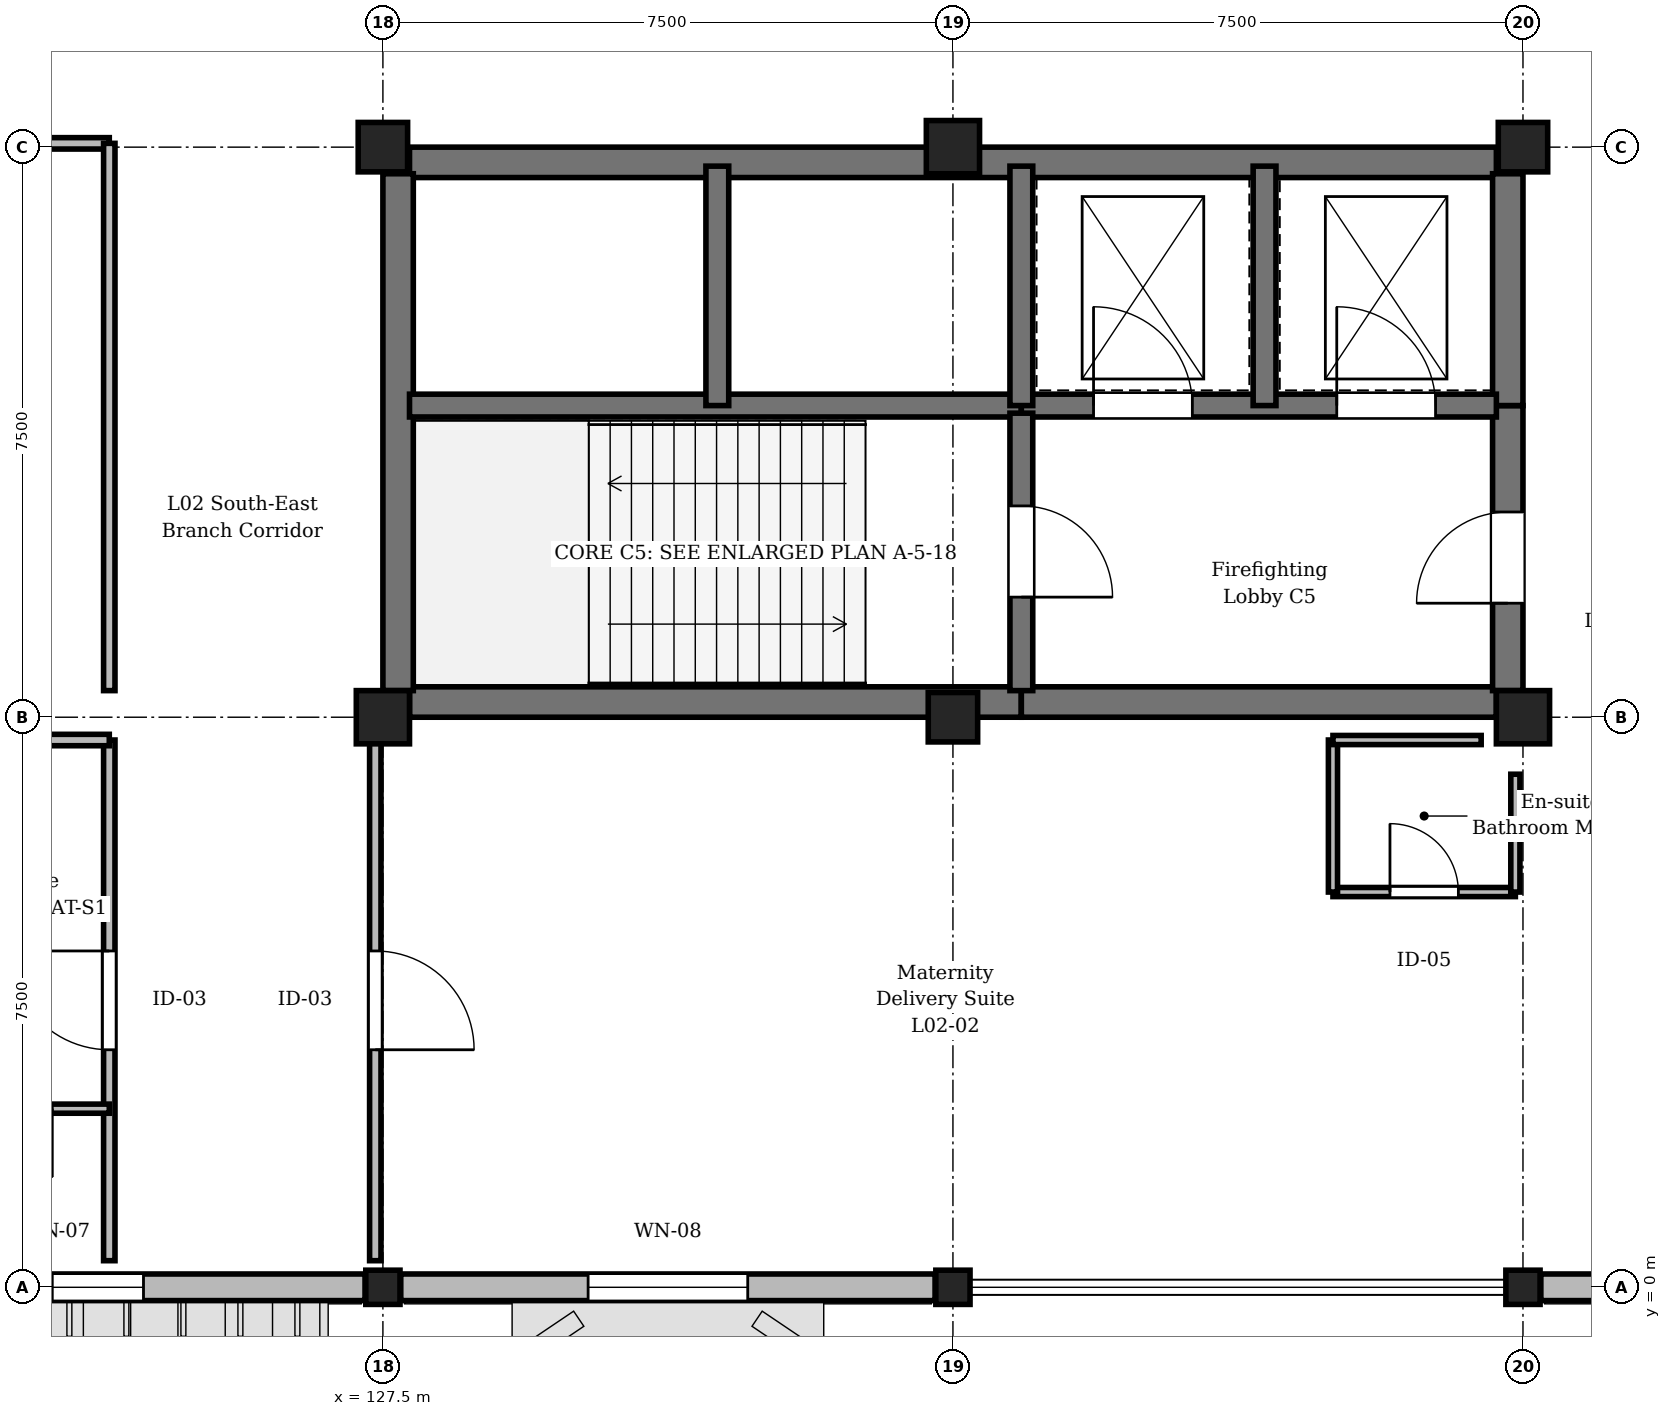
"""IFC4 building model, lengths in metres.
Left out: names, types, materials, properties, quantities, classifications, styles, units other than length and angle.
Written with IfcOpenShell. Run it as: python <this file> out.ifc"""

import sys

from ifc_helpers import new_model, si_unit, direction, frame, frame_2d, origin, origin_2d, place, context, subcontext, project, spatial, rectangle, extrude, element, fill, save


model = new_model("IFC4")
c1 = context("Model", 3, precision=1e-05, world=origin(), true_north=direction((0.0, 1.0)))
c2 = subcontext(c1, "Body", "Model", "MODEL_VIEW")
j1 = project(units=[si_unit("LENGTHUNIT", "METRE"), si_unit("PLANEANGLEUNIT", "RADIAN")], contexts=[c1])
p1 = place(None, origin())
s1 = spatial("IfcSite", under=j1, at=p1, CompositionType="ELEMENT")
p2 = place(p1, origin())
s2 = spatial("IfcBuilding", under=s1, at=p2, CompositionType="ELEMENT")
p3 = place(p2, frame((0.0, 0.0, 9.3)))
s3 = spatial("IfcBuildingStorey", under=s2, at=p3, CompositionType="ELEMENT", Elevation=9.3)
p4 = place(p3, frame((127.5, 0.0, 0.0), z_axis=(0.0, 0.0, 1.0), x_axis=(1.0, 0.0, 0.0)))
e1 = element("IfcColumn", 1, at=p4, inside=s3, PredefinedType="COLUMN", context=c2, shape_type="SweptSolid", body=[
    extrude(rectangle(XDim=0.45, YDim=0.45, at=origin_2d()), origin(), (0.0, 0.0, 1.0), 4.8),
])
p5 = place(p3, frame((127.5, 7.5, 0.0), z_axis=(0.0, 0.0, 1.0), x_axis=(1.0, 0.0, 0.0)))
e2 = element("IfcColumn", 2, at=p5, inside=s3, PredefinedType="COLUMN", context=c2, shape_type="SweptSolid", body=[
    extrude(rectangle(XDim=0.7, YDim=0.7, at=origin_2d()), origin(), (0.0, 0.0, 1.0), 4.8),
])
p6 = place(p3, frame((127.5, 15.0, 0.0), z_axis=(0.0, 0.0, 1.0), x_axis=(1.0, 0.0, 0.0)))
e3 = element("IfcColumn", 3, at=p6, inside=s3, PredefinedType="COLUMN", context=c2, shape_type="SweptSolid", body=[
    extrude(rectangle(XDim=0.65, YDim=0.65, at=origin_2d()), origin(), (0.0, 0.0, 1.0), 4.8),
])
p7 = place(p3, frame((135.0, 0.0, 0.0), z_axis=(0.0, 0.0, 1.0), x_axis=(1.0, 0.0, 0.0)))
e4 = element("IfcColumn", 4, at=p7, inside=s3, PredefinedType="COLUMN", context=c2, shape_type="SweptSolid", body=[
    extrude(rectangle(XDim=0.45, YDim=0.45, at=origin_2d()), origin(), (0.0, 0.0, 1.0), 4.8),
])
p8 = place(p3, frame((135.0, 7.5, 0.0), z_axis=(0.0, 0.0, 1.0), x_axis=(1.0, 0.0, 0.0)))
e5 = element("IfcColumn", 5, at=p8, inside=s3, PredefinedType="COLUMN", context=c2, shape_type="SweptSolid", body=[
    extrude(rectangle(XDim=0.65, YDim=0.65, at=origin_2d()), origin(), (0.0, 0.0, 1.0), 4.8),
])
p9 = place(p3, frame((135.0, 15.0, 0.0), z_axis=(0.0, 0.0, 1.0), x_axis=(1.0, 0.0, 0.0)))
e6 = element("IfcColumn", 6, at=p9, inside=s3, PredefinedType="COLUMN", context=c2, shape_type="SweptSolid", body=[
    extrude(rectangle(XDim=0.7, YDim=0.7, at=origin_2d()), origin(), (0.0, 0.0, 1.0), 4.8),
])
p10 = place(p3, frame((142.5, 0.0, 0.0), z_axis=(0.0, 0.0, 1.0), x_axis=(1.0, 0.0, 0.0)))
e7 = element("IfcColumn", 7, at=p10, inside=s3, PredefinedType="COLUMN", context=c2, shape_type="SweptSolid", body=[
    extrude(rectangle(XDim=0.45, YDim=0.45, at=origin_2d()), origin(), (0.0, 0.0, 1.0), 4.8),
])
p11 = place(p3, frame((142.5, 7.5, 0.0), z_axis=(0.0, 0.0, 1.0), x_axis=(1.0, 0.0, 0.0)))
e8 = element("IfcColumn", 8, at=p11, inside=s3, PredefinedType="COLUMN", context=c2, shape_type="SweptSolid", body=[
    extrude(rectangle(XDim=0.7, YDim=0.7, at=origin_2d()), origin(), (0.0, 0.0, 1.0), 4.8),
])
p12 = place(p3, frame((142.5, 15.0, 0.0), z_axis=(0.0, 0.0, 1.0), x_axis=(1.0, 0.0, 0.0)))
e9 = element("IfcColumn", 9, at=p12, inside=s3, PredefinedType="COLUMN", context=c2, shape_type="SweptSolid", body=[
    extrude(rectangle(XDim=0.65, YDim=0.65, at=origin_2d()), origin(), (0.0, 0.0, 1.0), 4.8),
])
p13 = place(p3, frame((127.265, 0.0, 0.0), z_axis=(0.0, 0.0, 1.0), x_axis=(-1.0, 0.0, 0.0)))
e10 = element("IfcWall", 10, at=p13, inside=s3, PredefinedType="STANDARD", context=c2, shape_type="SweptSolid", body=[
    extrude(rectangle(XDim=7.03, YDim=0.35, at=frame_2d((3.515, 0.0))), origin(), (0.0, 0.0, 1.0), 3.95),
])
p14 = place(p13, frame((2.915, 0.0, 0.9)))
e11 = element("IfcOpeningElement", 11, at=p14, cuts=e10, PredefinedType="OPENING", context=c2, shape_type="SweptSolid", body=[
    extrude(rectangle(XDim=1.2, YDim=2.1, at=frame_2d((0.6, 1.05))), frame((0.0, 0.185, 0.0), z_axis=(0.0, -1.0, 0.0), x_axis=(1.0, 0.0, 0.0)), (0.0, 0.0, 1.0), 0.37),
])
p15 = place(p3, frame((134.765, 0.0, 0.0), z_axis=(0.0, 0.0, 1.0), x_axis=(-1.0, 0.0, 0.0)))
e12 = element("IfcWall", 12, at=p15, inside=s3, PredefinedType="STANDARD", context=c2, shape_type="SweptSolid", body=[
    extrude(rectangle(XDim=7.03, YDim=0.35, at=frame_2d((3.515, 0.0))), origin(), (0.0, 0.0, 1.0), 3.95),
])
p16 = place(p15, frame((2.465, 0.0, 0.9)))
e13 = element("IfcOpeningElement", 13, at=p16, cuts=e12, PredefinedType="OPENING", context=c2, shape_type="SweptSolid", body=[
    extrude(rectangle(XDim=2.1, YDim=2.1, at=frame_2d((1.05, 1.05))), frame((0.0, 0.185, 0.0), z_axis=(0.0, -1.0, 0.0), x_axis=(1.0, 0.0, 0.0)), (0.0, 0.0, 1.0), 0.37),
])
p17 = place(p3, frame((149.765, 0.0, 0.0), z_axis=(0.0, 0.0, 1.0), x_axis=(-1.0, 0.0, 0.0)))
e14 = element("IfcWall", 14, at=p17, inside=s3, PredefinedType="STANDARD", context=c2, shape_type="SweptSolid", body=[
    extrude(rectangle(XDim=7.03, YDim=0.35, at=frame_2d((3.515, 0.0))), origin(), (0.0, 0.0, 1.0), 3.95),
])
p18 = place(p17, frame((2.715, 0.0, 0.9)))
e15 = element("IfcOpeningElement", 15, at=p18, cuts=e14, PredefinedType="OPENING", context=c2, shape_type="SweptSolid", body=[
    extrude(rectangle(XDim=1.6, YDim=1.95, at=frame_2d((0.8, 0.975))), frame((0.0, 0.185, 0.0), z_axis=(0.0, -1.0, 0.0), x_axis=(1.0, 0.0, 0.0)), (0.0, 0.0, 1.0), 0.37),
])
p19 = place(p3, frame((127.85, 7.7, 0.0), z_axis=(0.0, 0.0, 1.0), x_axis=(1.0, 0.0, 0.0)))
e16 = element("IfcWall", 16, at=p19, inside=s3, PredefinedType="SHEAR", context=c2, shape_type="SweptSolid", body=[
    extrude(rectangle(XDim=8.05, YDim=0.4, at=frame_2d((4.025, 0.0))), origin(), (0.0, 0.0, 1.0), 4.55),
])
p20 = place(p3, frame((135.9, 7.7, 0.0), z_axis=(0.0, 0.0, 1.0), x_axis=(1.0, 0.0, 0.0)))
e17 = element("IfcWall", 17, at=p20, inside=s3, PredefinedType="SHEAR", context=c2, shape_type="SweptSolid", body=[
    extrude(rectangle(XDim=6.25, YDim=0.4, at=frame_2d((3.125, 0.0))), origin(), (0.0, 0.0, 1.0), 4.55),
])
p21 = place(p3, frame((127.85, 14.8, 0.0), z_axis=(0.0, 0.0, 1.0), x_axis=(1.0, 0.0, 0.0)))
e18 = element("IfcWall", 18, at=p21, inside=s3, PredefinedType="SHEAR", context=c2, shape_type="SweptSolid", body=[
    extrude(rectangle(XDim=14.3, YDim=0.4, at=frame_2d((7.15, 0.0))), origin(), (0.0, 0.0, 1.0), 4.55),
])
p22 = place(p3, frame((127.7, 7.85, 0.0), z_axis=(0.0, 0.0, 1.0), x_axis=(0.0, 1.0, 0.0)))
e19 = element("IfcWall", 19, at=p22, inside=s3, PredefinedType="SHEAR", context=c2, shape_type="SweptSolid", body=[
    extrude(rectangle(XDim=6.8, YDim=0.4, at=frame_2d((3.4, 0.0))), origin(), (0.0, 0.0, 1.0), 4.55),
])
p23 = place(p3, frame((142.3, 7.85, 0.0), z_axis=(0.0, 0.0, 1.0), x_axis=(0.0, 1.0, 0.0)))
e20 = element("IfcWall", 20, at=p23, inside=s3, PredefinedType="SHEAR", context=c2, shape_type="SweptSolid", body=[
    extrude(rectangle(XDim=3.75, YDim=0.4, at=frame_2d((1.875, 0.0))), origin(), (0.0, 0.0, 1.0), 4.55),
])
p24 = place(p23, frame((1.15, 0.0, 0.0)))
e21 = element("IfcOpeningElement", 21, at=p24, cuts=e20, PredefinedType="OPENING", context=c2, shape_type="SweptSolid", body=[
    extrude(rectangle(XDim=1.2, YDim=2.25, at=frame_2d((0.6, 1.125))), frame((0.0, 0.21, 0.0), z_axis=(0.0, -1.0, 0.0), x_axis=(1.0, 0.0, 0.0)), (0.0, 0.0, 1.0), 0.42),
])
p25 = place(p3, frame((142.3, 11.6, 0.0), z_axis=(0.0, 0.0, 1.0), x_axis=(0.0, 1.0, 0.0)))
e22 = element("IfcWall", 22, at=p25, inside=s3, PredefinedType="SHEAR", context=c2, shape_type="SweptSolid", body=[
    extrude(rectangle(XDim=3.05, YDim=0.4, at=frame_2d((1.525, 0.0))), origin(), (0.0, 0.0, 1.0), 4.55),
])
p26 = place(p3, frame((127.85, 11.6, 0.0), z_axis=(0.0, 0.0, 1.0), x_axis=(1.0, 0.0, 0.0)))
e23 = element("IfcWall", 23, at=p26, inside=s3, PredefinedType="SHEAR", context=c2, shape_type="SweptSolid", body=[
    extrude(rectangle(XDim=8.05, YDim=0.3, at=frame_2d((4.025, 0.0))), origin(), (0.0, 0.0, 1.0), 4.55),
])
p27 = place(p3, frame((135.9, 11.6, 0.0), z_axis=(0.0, 0.0, 1.0), x_axis=(1.0, 0.0, 0.0)))
e24 = element("IfcWall", 24, at=p27, inside=s3, PredefinedType="SHEAR", context=c2, shape_type="SweptSolid", body=[
    extrude(rectangle(XDim=6.25, YDim=0.3, at=frame_2d((3.125, 0.0))), origin(), (0.0, 0.0, 1.0), 4.55),
])
p28 = place(p27, frame((0.95, 0.0, 0.0)))
e25 = element("IfcOpeningElement", 25, at=p28, cuts=e24, PredefinedType="OPENING", context=c2, shape_type="SweptSolid", body=[
    extrude(rectangle(XDim=1.3, YDim=2.2, at=frame_2d((0.65, 1.1))), frame((0.0, 0.16, 0.0), z_axis=(0.0, -1.0, 0.0), x_axis=(1.0, 0.0, 0.0)), (0.0, 0.0, 1.0), 0.32),
])
p29 = place(p27, frame((4.15, 0.0, 0.0)))
e26 = element("IfcOpeningElement", 26, at=p29, cuts=e24, PredefinedType="OPENING", context=c2, shape_type="SweptSolid", body=[
    extrude(rectangle(XDim=1.3, YDim=2.2, at=frame_2d((0.65, 1.1))), frame((0.0, 0.16, 0.0), z_axis=(0.0, -1.0, 0.0), x_axis=(1.0, 0.0, 0.0)), (0.0, 0.0, 1.0), 0.32),
])
p30 = place(p3, frame((135.9, 11.5, 0.0), z_axis=(0.0, 0.0, 1.0), x_axis=(0.0, -1.0, 0.0)))
e27 = element("IfcWall", 27, at=p30, inside=s3, PredefinedType="SHEAR", context=c2, shape_type="SweptSolid", body=[
    extrude(rectangle(XDim=3.65, YDim=0.3, at=frame_2d((1.825, 0.0))), origin(), (0.0, 0.0, 1.0), 4.55),
])
p31 = place(p30, frame((1.22, 0.0, 0.0)))
e28 = element("IfcOpeningElement", 28, at=p31, cuts=e27, PredefinedType="OPENING", context=c2, shape_type="SweptSolid", body=[
    extrude(rectangle(XDim=1.2, YDim=2.25, at=frame_2d((0.6, 1.125))), frame((0.0, 0.16, 0.0), z_axis=(0.0, -1.0, 0.0), x_axis=(1.0, 0.0, 0.0)), (0.0, 0.0, 1.0), 0.32),
])
for number, where, z_axis, x_axis in (
    (29, (131.9, 11.6, 0.0), (0.0, 0.0, 1.0), (0.0, 1.0, 0.0)),
    (30, (135.9, 11.6, 0.0), (0.0, 0.0, 1.0), (0.0, 1.0, 0.0)),
    (31, (139.1, 11.6, 0.0), (0.0, 0.0, 1.0), (0.0, 1.0, 0.0)),
):
    element("IfcWall", number, at=place(p3, frame(where, z_axis=z_axis, x_axis=x_axis)), inside=s3, PredefinedType="SHEAR", context=c2, shape_type="SweptSolid", body=[
        extrude(rectangle(XDim=3.15, YDim=0.3, at=frame_2d((1.575, 0.0))), origin(), (0.0, 0.0, 1.0), 4.55),
    ])
p32 = place(p3, frame((123.9, 0.35, 0.0), z_axis=(0.0, 0.0, 1.0), x_axis=(0.0, 1.0, 0.0)))
e32 = element("IfcWall", 32, at=p32, inside=s3, PredefinedType="PARTITIONING", context=c2, shape_type="SweptSolid", body=[
    extrude(rectangle(XDim=6.85, YDim=0.15, at=frame_2d((3.425, 0.0))), origin(), (0.0, 0.0, 1.0), 4.535),
])
p33 = place(p32, frame((2.775, 0.0, 0.0)))
e33 = element("IfcOpeningElement", 33, at=p33, cuts=e32, PredefinedType="OPENING", context=c2, shape_type="SweptSolid", body=[
    extrude(rectangle(XDim=1.3, YDim=2.2, at=frame_2d((0.65, 1.1))), frame((0.0, 0.085, 0.0), z_axis=(0.0, -1.0, 0.0), x_axis=(1.0, 0.0, 0.0)), (0.0, 0.0, 1.0), 0.17),
])
p34 = place(p3, frame((123.9, 2.35, 0.0), z_axis=(0.0, 0.0, 1.0), x_axis=(-1.0, 0.0, 0.0)))
e34 = element("IfcWall", 34, at=p34, inside=s3, PredefinedType="PARTITIONING", context=c2, shape_type="SweptSolid", body=[
    extrude(rectangle(XDim=2.4, YDim=0.12, at=frame_2d((1.2, 0.0))), origin(), (0.0, 0.0, 1.0), 4.535),
])
p35 = place(p34, frame((0.75, 0.0, 0.0)))
e35 = element("IfcOpeningElement", 35, at=p35, cuts=e34, PredefinedType="OPENING", context=c2, shape_type="SweptSolid", body=[
    extrude(rectangle(XDim=0.9, YDim=2.1, at=frame_2d((0.45, 1.05))), frame((0.0, 0.07, 0.0), z_axis=(0.0, -1.0, 0.0), x_axis=(1.0, 0.0, 0.0)), (0.0, 0.0, 1.0), 0.14),
])
p36 = place(p3, frame((127.4, 7.2, 0.0), z_axis=(0.0, 0.0, 1.0), x_axis=(0.0, -1.0, 0.0)))
e36 = element("IfcWall", 36, at=p36, inside=s3, PredefinedType="PARTITIONING", context=c2, shape_type="SweptSolid", body=[
    extrude(rectangle(XDim=6.85, YDim=0.15, at=frame_2d((3.425, 0.0))), origin(), (0.0, 0.0, 1.0), 4.035),
])
p37 = place(p36, frame((2.775, 0.0, 0.0)))
e37 = element("IfcOpeningElement", 37, at=p37, cuts=e36, PredefinedType="OPENING", context=c2, shape_type="SweptSolid", body=[
    extrude(rectangle(XDim=1.3, YDim=2.2, at=frame_2d((0.65, 1.1))), frame((0.0, 0.085, 0.0), z_axis=(0.0, -1.0, 0.0), x_axis=(1.0, 0.0, 0.0)), (0.0, 0.0, 1.0), 0.17),
])
p38 = place(p3, frame((140.0, 5.2, 0.0), z_axis=(0.0, 0.0, 1.0), x_axis=(1.0, 0.0, 0.0)))
e38 = element("IfcWall", 38, at=p38, inside=s3, PredefinedType="PARTITIONING", context=c2, shape_type="SweptSolid", body=[
    extrude(rectangle(XDim=2.4, YDim=0.12, at=frame_2d((1.2, 0.0))), origin(), (0.0, 0.0, 1.0), 4.535),
])
p39 = place(p38, frame((0.75, 0.0, 0.0)))
e39 = element("IfcOpeningElement", 39, at=p39, cuts=e38, PredefinedType="OPENING", context=c2, shape_type="SweptSolid", body=[
    extrude(rectangle(XDim=0.9, YDim=2.1, at=frame_2d((0.45, 1.05))), frame((0.0, 0.07, 0.0), z_axis=(0.0, -1.0, 0.0), x_axis=(1.0, 0.0, 0.0)), (0.0, 0.0, 1.0), 0.14),
])
p40 = place(p3, frame((140.0, 5.2, 0.0), z_axis=(0.0, 0.0, 1.0), x_axis=(0.0, 1.0, 0.0)))
e40 = element("IfcWall", 40, at=p40, inside=s3, PredefinedType="PARTITIONING", context=c2, shape_type="SweptSolid", body=[
    extrude(rectangle(XDim=2.0, YDim=0.12, at=frame_2d((1.0, 0.0))), origin(), (0.0, 0.0, 1.0), 4.535),
])
p41 = place(p3, frame((123.9, 15.05, 0.0), z_axis=(0.0, 0.0, 1.0), x_axis=(-1.0, 0.0, 0.0)))
e41 = element("IfcWall", 41, at=p41, inside=s3, PredefinedType="PARTITIONING", context=c2, shape_type="SweptSolid", body=[
    extrude(rectangle(XDim=11.05, YDim=0.15, at=frame_2d((5.525, 0.0))), origin(), (0.0, 0.0, 1.0), 3.985),
])
p42 = place(p41, frame((6.76, 0.0, 0.0)))
e42 = element("IfcOpeningElement", 42, at=p42, cuts=e41, PredefinedType="OPENING", context=c2, shape_type="SweptSolid", body=[
    extrude(rectangle(XDim=1.25, YDim=2.2, at=frame_2d((0.625, 1.1))), frame((0.0, 0.085, 0.0), z_axis=(0.0, -1.0, 0.0), x_axis=(1.0, 0.0, 0.0)), (0.0, 0.0, 1.0), 0.17),
])
p43 = place(p3, frame((112.85, 7.2, 0.0), z_axis=(0.0, 0.0, 1.0), x_axis=(1.0, 0.0, 0.0)))
e43 = element("IfcWall", 43, at=p43, inside=s3, PredefinedType="PARTITIONING", context=c2, shape_type="SweptSolid", body=[
    extrude(rectangle(XDim=11.05, YDim=0.15, at=frame_2d((5.525, 0.0))), origin(), (0.0, 0.0, 1.0), 3.985),
])
p44 = place(p3, frame((123.9, 7.85, 0.0), z_axis=(0.0, 0.0, 1.0), x_axis=(0.0, 1.0, 0.0)))
e44 = element("IfcWall", 44, at=p44, inside=s3, PredefinedType="PARTITIONING", context=c2, shape_type="SweptSolid", body=[
    extrude(rectangle(XDim=7.2, YDim=0.15, at=frame_2d((3.6, 0.0))), origin(), (0.0, 0.0, 1.0), 4.535),
])
p45 = place(p3, frame((140.0, 7.2, 0.0), z_axis=(0.0, 0.0, 1.0), x_axis=(1.0, 0.0, 0.0)))
e45 = element("IfcWall", 45, at=p45, inside=s3, PredefinedType="PARTITIONING", context=c2, shape_type="SweptSolid", body=[
    extrude(rectangle(XDim=1.95, YDim=0.12, at=frame_2d((0.975, 0.0))), origin(), (0.0, 0.0, 1.0), 3.985),
])
p46 = place(p3, frame((142.4, 5.2, 0.0), z_axis=(0.0, 0.0, 1.0), x_axis=(0.0, 1.0, 0.0)))
e46 = element("IfcWall", 46, at=p46, inside=s3, PredefinedType="PARTITIONING", context=c2, shape_type="SweptSolid", body=[
    extrude(rectangle(XDim=1.55, YDim=0.12, at=frame_2d((0.775, 0.0))), origin(), (0.0, 0.0, 1.0), 4.035),
])
p47 = place(p14, origin())
e47 = element("IfcWindow", 47, at=p47, inside=s3, PartitioningType="SINGLE_PANEL", PredefinedType="WINDOW", context=c2, shape_type="SweptSolid", body=[
    extrude(rectangle(XDim=1.2, YDim=2.1, at=frame_2d((0.6, 1.05))), frame((0.0, 0.03, 0.0), z_axis=(0.0, -1.0, 0.0), x_axis=(1.0, 0.0, 0.0)), (0.0, 0.0, 1.0), 0.06),
])
fill(e11, e47)
p48 = place(p16, origin())
e48 = element("IfcWindow", 48, at=p48, inside=s3, PartitioningType="SINGLE_PANEL", PredefinedType="WINDOW", context=c2, shape_type="SweptSolid", body=[
    extrude(rectangle(XDim=2.1, YDim=2.1, at=frame_2d((1.05, 1.05))), frame((0.0, 0.03, 0.0), z_axis=(0.0, -1.0, 0.0), x_axis=(1.0, 0.0, 0.0)), (0.0, 0.0, 1.0), 0.06),
])
fill(e13, e48)
p49 = place(p24, origin())
e49 = element("IfcDoor", 49, at=p49, inside=s3, OperationType="SINGLE_SWING_LEFT", PredefinedType="DOOR", context=c2, shape_type="SweptSolid", body=[
    extrude(rectangle(XDim=1.2, YDim=2.25, at=frame_2d((0.6, 1.125))), frame((0.0, 0.025, 0.0), z_axis=(0.0, -1.0, 0.0), x_axis=(1.0, 0.0, 0.0)), (0.0, 0.0, 1.0), 0.05),
])
fill(e21, e49)
p50 = place(p28, origin())
e50 = element("IfcDoor", 50, at=p50, inside=s3, OperationType="DOUBLE_DOOR_SLIDING", PredefinedType="DOOR", context=c2, shape_type="SweptSolid", body=[
    extrude(rectangle(XDim=1.3, YDim=2.2, at=frame_2d((0.65, 1.1))), frame((0.0, 0.025, 0.0), z_axis=(0.0, -1.0, 0.0), x_axis=(1.0, 0.0, 0.0)), (0.0, 0.0, 1.0), 0.05),
])
fill(e25, e50)
p51 = place(p29, origin())
e51 = element("IfcDoor", 51, at=p51, inside=s3, OperationType="DOUBLE_DOOR_SLIDING", PredefinedType="DOOR", context=c2, shape_type="SweptSolid", body=[
    extrude(rectangle(XDim=1.3, YDim=2.2, at=frame_2d((0.65, 1.1))), frame((0.0, 0.025, 0.0), z_axis=(0.0, -1.0, 0.0), x_axis=(1.0, 0.0, 0.0)), (0.0, 0.0, 1.0), 0.05),
])
fill(e26, e51)
p52 = place(p31, origin())
e52 = element("IfcDoor", 52, at=p52, inside=s3, OperationType="SINGLE_SWING_RIGHT", PredefinedType="DOOR", context=c2, shape_type="SweptSolid", body=[
    extrude(rectangle(XDim=1.2, YDim=2.25, at=frame_2d((0.6, 1.125))), frame((0.0, 0.025, 0.0), z_axis=(0.0, -1.0, 0.0), x_axis=(1.0, 0.0, 0.0)), (0.0, 0.0, 1.0), 0.05),
])
fill(e28, e52)
p53 = place(p33, origin())
e53 = element("IfcDoor", 53, at=p53, inside=s3, OperationType="SINGLE_SWING_RIGHT", PredefinedType="DOOR", context=c2, shape_type="SweptSolid", body=[
    extrude(rectangle(XDim=1.3, YDim=2.2, at=frame_2d((0.65, 1.1))), frame((0.0, 0.025, 0.0), z_axis=(0.0, -1.0, 0.0), x_axis=(1.0, 0.0, 0.0)), (0.0, 0.0, 1.0), 0.05),
])
fill(e33, e53)
p54 = place(p37, origin())
e54 = element("IfcDoor", 54, at=p54, inside=s3, OperationType="SINGLE_SWING_RIGHT", PredefinedType="DOOR", context=c2, shape_type="SweptSolid", body=[
    extrude(rectangle(XDim=1.3, YDim=2.2, at=frame_2d((0.65, 1.1))), frame((0.0, 0.025, 0.0), z_axis=(0.0, -1.0, 0.0), x_axis=(1.0, 0.0, 0.0)), (0.0, 0.0, 1.0), 0.05),
])
fill(e37, e54)
p55 = place(p39, origin())
e55 = element("IfcDoor", 55, at=p55, inside=s3, OperationType="SINGLE_SWING_LEFT", PredefinedType="DOOR", context=c2, shape_type="SweptSolid", body=[
    extrude(rectangle(XDim=0.9, YDim=2.1, at=frame_2d((0.45, 1.05))), frame((0.0, 0.025, 0.0), z_axis=(0.0, -1.0, 0.0), x_axis=(1.0, 0.0, 0.0)), (0.0, 0.0, 1.0), 0.05),
])
fill(e39, e55)
save(model, sys.argv[1])
